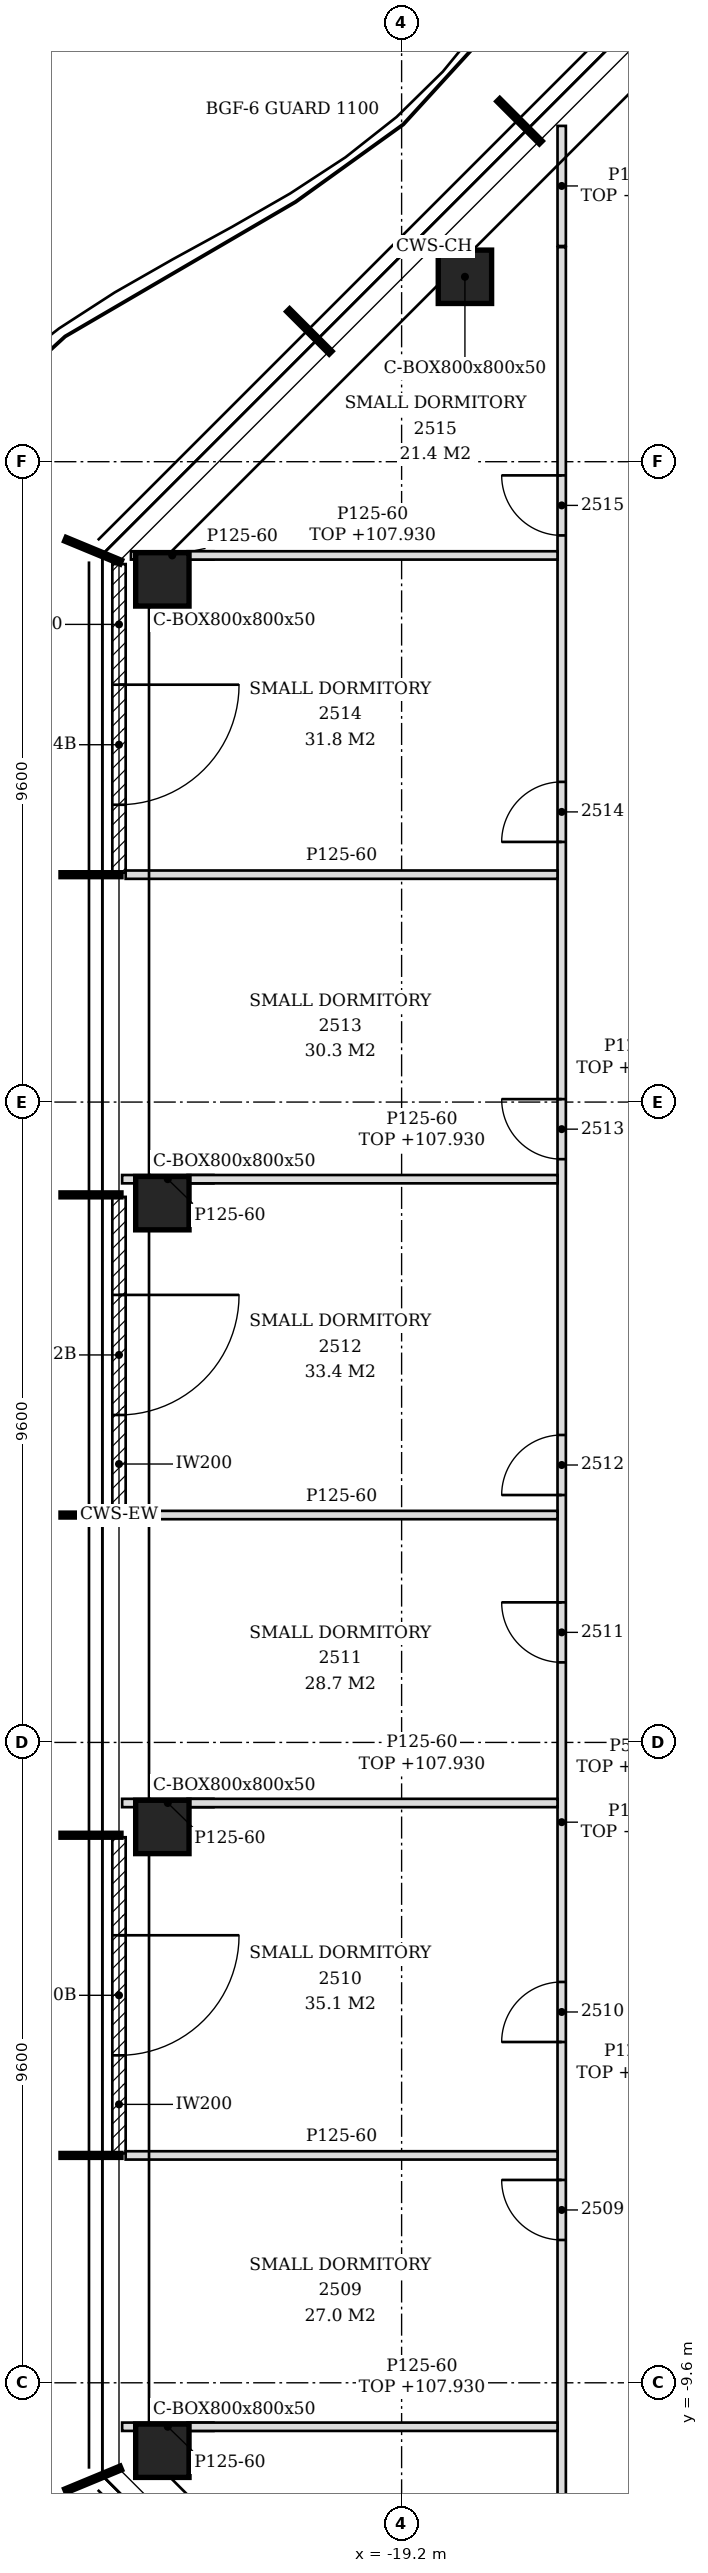
"""IFC4 building model, lengths in metres.
Left out: names, types, materials, properties, quantities, classifications, styles, units other than length and angle.
Written with IfcOpenShell. Run it as: python <this file> out.ifc"""

import sys

from ifc_helpers import new_model, si_unit, direction, frame, frame_2d, origin, origin_2d, place, context, subcontext, project, spatial, polyline, rectangle, hollow_rectangle, outline, extrude, clip, halfspace, element, fill, save


model = new_model("IFC4")
c1 = context("Model", 3, precision=1e-05, world=origin(), true_north=direction((0.0, 1.0)))
c2 = subcontext(c1, "Body", "Model", "MODEL_VIEW")
j1 = project(units=[si_unit("LENGTHUNIT", "METRE"), si_unit("PLANEANGLEUNIT", "RADIAN")], contexts=[c1])
p1 = place(None, origin())
s1 = spatial("IfcSite", under=j1, at=p1, CompositionType="ELEMENT")
p2 = place(p1, origin())
s2 = spatial("IfcBuilding", under=s1, at=p2, CompositionType="ELEMENT")
p3 = place(p2, frame((0.0, 0.0, 105.0)))
s3 = spatial("IfcBuildingStorey", under=s2, at=p3, CompositionType="ELEMENT", Elevation=105.0)
for number, where, z_axis, x_axis in (
    (1, (-18.251, 21.972, -0.15), (0.282, 0.188, 0.941), (-0.555, 0.832, 0.0)),
    (2, (-22.787, 17.436, -0.15), (0.282, 0.188, 0.941), (-0.555, 0.832, 0.0)),
    (3, (-22.787, 8.084, -0.15), (0.282, 0.188, 0.941), (-0.555, 0.832, 0.0)),
    (4, (-22.787, -1.267, -0.15), (0.282, 0.188, 0.941), (-0.555, 0.832, 0.0)),
    (5, (-22.787, -10.619, -0.15), (0.282, 0.188, 0.941), (-0.555, 0.832, 0.0)),
):
    element("IfcColumn", number, at=place(p3, frame(where, z_axis=z_axis, x_axis=x_axis)), inside=s3, PredefinedType="COLUMN", context=c2, shape_type="Clipping", body=[
        clip(clip(extrude(hollow_rectangle(XDim=0.8, YDim=0.8, WallThickness=0.05, at=origin_2d()), origin(), (0.0, 0.0, 1.0), 3.826), halfspace(frame((0.0, 0.0, 0.024), z_axis=(0.0, 0.0, 1.0), x_axis=(1.0, 0.0, 0.0)), True)), halfspace(frame((0.0, 0.0, 3.802), z_axis=(0.0, 0.0, 1.0), x_axis=(1.0, 0.0, 0.0)), False)),
    ])
p4 = place(p3, frame((-23.437, 17.665, 0.0), z_axis=(0.0, 0.0, 1.0), x_axis=(0.0, -1.0, 0.0)))
e6 = element("IfcWall", 6, at=p4, inside=s3, PredefinedType="NOTDEFINED", context=c2, shape_type="SweptSolid", body=[
    extrude(rectangle(XDim=4.626, YDim=0.2, at=frame_2d((2.313, 0.0))), origin(), (0.0, 0.0, 1.0), 3.45),
])
p5 = place(p4, frame((1.808, 0.0, 0.0)))
e7 = element("IfcOpeningElement", 7, at=p5, cuts=e6, PredefinedType="OPENING", context=c2, shape_type="SweptSolid", body=[
    extrude(rectangle(XDim=1.8, YDim=2.4, at=frame_2d((0.9, 1.2))), frame((0.0, 0.11, 0.0), z_axis=(0.0, -1.0, 0.0), x_axis=(1.0, 0.0, 0.0)), (0.0, 0.0, 1.0), 0.22),
])
p6 = place(p3, frame((-23.437, 8.179, 0.0), z_axis=(0.0, 0.0, 1.0), x_axis=(0.0, -1.0, 0.0)))
e8 = element("IfcWall", 8, at=p6, inside=s3, PredefinedType="NOTDEFINED", context=c2, shape_type="SweptSolid", body=[
    extrude(rectangle(XDim=4.74, YDim=0.2, at=frame_2d((2.37, 0.0))), origin(), (0.0, 0.0, 1.0), 3.45),
])
p7 = place(p6, frame((1.47, 0.0, 0.0)))
e9 = element("IfcOpeningElement", 9, at=p7, cuts=e8, PredefinedType="OPENING", context=c2, shape_type="SweptSolid", body=[
    extrude(rectangle(XDim=1.8, YDim=2.4, at=frame_2d((0.9, 1.2))), frame((0.0, 0.11, 0.0), z_axis=(0.0, -1.0, 0.0), x_axis=(1.0, 0.0, 0.0)), (0.0, 0.0, 1.0), 0.22),
])
p8 = place(p3, frame((-23.437, -1.421, 0.0), z_axis=(0.0, 0.0, 1.0), x_axis=(0.0, -1.0, 0.0)))
e10 = element("IfcWall", 10, at=p8, inside=s3, PredefinedType="NOTDEFINED", context=c2, shape_type="SweptSolid", body=[
    extrude(rectangle(XDim=4.74, YDim=0.2, at=frame_2d((2.37, 0.0))), origin(), (0.0, 0.0, 1.0), 3.45),
])
p9 = place(p8, frame((1.47, 0.0, 0.0)))
e11 = element("IfcOpeningElement", 11, at=p9, cuts=e10, PredefinedType="OPENING", context=c2, shape_type="SweptSolid", body=[
    extrude(rectangle(XDim=1.8, YDim=2.4, at=frame_2d((0.9, 1.2))), frame((0.0, 0.11, 0.0), z_axis=(0.0, -1.0, 0.0), x_axis=(1.0, 0.0, 0.0)), (0.0, 0.0, 1.0), 0.22),
])
p10 = place(p3, frame((-16.8, -14.137, 0.0), z_axis=(0.0, 0.0, 1.0), x_axis=(0.0, 1.0, 0.0)))
e12 = element("IfcWall", 12, at=p10, inside=s3, PredefinedType="PARTITIONING", context=c2, shape_type="SweptSolid", body=[
    extrude(outline(polyline([(0.0, 0.0), (36.554, 0.0), (36.554, 0.863), (36.554, 1.725), (36.554, 2.587), (36.554, 2.98), (0.0, 2.98), (0.0, 2.587), (0.0, 1.725), (0.0, 0.863), (0.0, 0.0)])), frame((0.0, 0.062, 0.0), z_axis=(0.0, -1.0, 0.0), x_axis=(1.0, 0.0, 0.0)), (0.0, 0.0, 1.0), 0.125),
])
p11 = place(p10, frame((1.038, 0.0, 0.0)))
e13 = element("IfcOpeningElement", 13, at=p11, cuts=e12, PredefinedType="OPENING", context=c2, shape_type="SweptSolid", body=[
    extrude(rectangle(XDim=0.9, YDim=2.1, at=frame_2d((0.45, 1.05))), frame((0.0, 0.073, 0.0), z_axis=(0.0, -1.0, 0.0), x_axis=(1.0, 0.0, 0.0)), (0.0, 0.0, 1.0), 0.145),
])
p12 = place(p10, frame((6.678, 0.0, 0.0)))
e14 = element("IfcOpeningElement", 14, at=p12, cuts=e12, PredefinedType="OPENING", context=c2, shape_type="SweptSolid", body=[
    extrude(rectangle(XDim=0.9, YDim=2.1, at=frame_2d((0.45, 1.05))), frame((0.0, 0.073, 0.0), z_axis=(0.0, -1.0, 0.0), x_axis=(1.0, 0.0, 0.0)), (0.0, 0.0, 1.0), 0.145),
])
p13 = place(p10, frame((9.646, 0.0, 0.0)))
e15 = element("IfcOpeningElement", 15, at=p13, cuts=e12, PredefinedType="OPENING", context=c2, shape_type="SweptSolid", body=[
    extrude(rectangle(XDim=0.9, YDim=2.1, at=frame_2d((0.45, 1.05))), frame((0.0, 0.073, 0.0), z_axis=(0.0, -1.0, 0.0), x_axis=(1.0, 0.0, 0.0)), (0.0, 0.0, 1.0), 0.145),
])
p14 = place(p10, frame((15.337, 0.0, 0.0)))
e16 = element("IfcOpeningElement", 16, at=p14, cuts=e12, PredefinedType="OPENING", context=c2, shape_type="SweptSolid", body=[
    extrude(rectangle(XDim=0.9, YDim=2.1, at=frame_2d((0.45, 1.05))), frame((0.0, 0.073, 0.0), z_axis=(0.0, -1.0, 0.0), x_axis=(1.0, 0.0, 0.0)), (0.0, 0.0, 1.0), 0.145),
])
p15 = place(p10, frame((17.846, 0.0, 0.0)))
e17 = element("IfcOpeningElement", 17, at=p15, cuts=e12, PredefinedType="OPENING", context=c2, shape_type="SweptSolid", body=[
    extrude(rectangle(XDim=0.9, YDim=2.1, at=frame_2d((0.45, 1.05))), frame((0.0, 0.073, 0.0), z_axis=(0.0, -1.0, 0.0), x_axis=(1.0, 0.0, 0.0)), (0.0, 0.0, 1.0), 0.145),
])
p16 = place(p10, frame((22.882, 0.0, 0.0)))
e18 = element("IfcOpeningElement", 18, at=p16, cuts=e12, PredefinedType="OPENING", context=c2, shape_type="SweptSolid", body=[
    extrude(rectangle(XDim=0.9, YDim=2.1, at=frame_2d((0.45, 1.05))), frame((0.0, 0.073, 0.0), z_axis=(0.0, -1.0, 0.0), x_axis=(1.0, 0.0, 0.0)), (0.0, 0.0, 1.0), 0.145),
])
p17 = place(p10, frame((27.637, 0.0, 0.0)))
e19 = element("IfcOpeningElement", 19, at=p17, cuts=e12, PredefinedType="OPENING", context=c2, shape_type="SweptSolid", body=[
    extrude(rectangle(XDim=0.9, YDim=2.1, at=frame_2d((0.45, 1.05))), frame((0.0, 0.073, 0.0), z_axis=(0.0, -1.0, 0.0), x_axis=(1.0, 0.0, 0.0)), (0.0, 0.0, 1.0), 0.145),
])
p18 = place(p10, frame((32.232, 0.0, 0.0)))
e20 = element("IfcOpeningElement", 20, at=p18, cuts=e12, PredefinedType="OPENING", context=c2, shape_type="SweptSolid", body=[
    extrude(rectangle(XDim=0.9, YDim=2.1, at=frame_2d((0.45, 1.05))), frame((0.0, 0.073, 0.0), z_axis=(0.0, -1.0, 0.0), x_axis=(1.0, 0.0, 0.0)), (0.0, 0.0, 1.0), 0.145),
])
p19 = place(p3, frame((-23.39, -10.259, 0.0), z_axis=(0.0, 0.0, 1.0), x_axis=(1.0, 0.0, 0.0)))
e21 = element("IfcWall", 21, at=p19, inside=s3, PredefinedType="PARTITIONING", context=c2, shape_type="SweptSolid", body=[
    extrude(outline(polyline([(0.0, 0.0), (0.327, 0.0), (0.331, 0.863), (0.622, 1.725), (0.995, 2.587), (1.369, 3.45), (0.0, 3.45), (0.0, 2.587), (0.0, 1.725), (0.0, 0.863), (0.0, 0.0)])), frame((0.0, 0.062, 0.0), z_axis=(0.0, -1.0, 0.0), x_axis=(1.0, 0.0, 0.0)), (0.0, 0.0, 1.0), 0.125),
])
p20 = place(p3, frame((-22.409, -10.259, 0.0), z_axis=(0.0, 0.0, 1.0), x_axis=(1.0, 0.0, 0.0)))
e22 = element("IfcWall", 22, at=p20, inside=s3, PredefinedType="PARTITIONING", context=c2, shape_type="SweptSolid", body=[
    extrude(outline(polyline([(0.0, 0.0), (5.547, 0.0), (5.547, 0.863), (5.547, 1.725), (5.547, 2.587), (5.547, 2.93), (0.977, 2.93), (0.977, 2.587), (0.747, 1.725), (0.373, 0.863), (0.0, 0.0)])), frame((0.0, 0.062, 0.0), z_axis=(0.0, -1.0, 0.0), x_axis=(1.0, 0.0, 0.0)), (0.0, 0.0, 1.0), 0.125),
])
p21 = place(p3, frame((-23.337, -6.191, 0.0), z_axis=(0.0, 0.0, 1.0), x_axis=(1.0, 0.0, 0.0)))
e23 = element("IfcWall", 23, at=p21, inside=s3, PredefinedType="PARTITIONING", context=c2, shape_type="SweptSolid", body=[
    extrude(outline(polyline([(0.0, 0.0), (6.475, 0.0), (6.475, 3.45), (1.779, 3.45), (1.777, 2.93), (1.479, 2.93), (1.477, 3.45), (0.0, 3.45), (0.0, 0.0)])), frame((0.0, 0.062, 0.0), z_axis=(0.0, -1.0, 0.0), x_axis=(1.0, 0.0, 0.0)), (0.0, 0.0, 1.0), 0.125),
])
p22 = place(p3, frame((-23.39, -0.908, 0.0), z_axis=(0.0, 0.0, 1.0), x_axis=(1.0, 0.0, 0.0)))
e24 = element("IfcWall", 24, at=p22, inside=s3, PredefinedType="PARTITIONING", context=c2, shape_type="SweptSolid", body=[
    extrude(outline(polyline([(0.0, 0.0), (0.327, 0.0), (0.331, 0.863), (0.622, 1.725), (0.996, 2.587), (1.369, 3.45), (0.0, 3.45), (0.0, 2.587), (0.0, 1.725), (0.0, 0.863), (0.0, 0.0)])), frame((0.0, 0.062, 0.0), z_axis=(0.0, -1.0, 0.0), x_axis=(1.0, 0.0, 0.0)), (0.0, 0.0, 1.0), 0.125),
])
p23 = place(p3, frame((-22.409, -0.908, 0.0), z_axis=(0.0, 0.0, 1.0), x_axis=(1.0, 0.0, 0.0)))
e25 = element("IfcWall", 25, at=p23, inside=s3, PredefinedType="PARTITIONING", context=c2, shape_type="SweptSolid", body=[
    extrude(outline(polyline([(0.0, 0.0), (5.546, 0.0), (5.546, 0.863), (5.546, 1.725), (5.546, 2.587), (5.546, 2.93), (0.975, 2.93), (0.975, 2.587), (0.747, 1.725), (0.373, 0.863), (0.0, 0.0)])), frame((0.0, 0.062, 0.0), z_axis=(0.0, -1.0, 0.0), x_axis=(1.0, 0.0, 0.0)), (0.0, 0.0, 1.0), 0.125),
])
p24 = place(p3, frame((-23.337, 3.409, 0.0), z_axis=(0.0, 0.0, 1.0), x_axis=(1.0, 0.0, 0.0)))
e26 = element("IfcWall", 26, at=p24, inside=s3, PredefinedType="PARTITIONING", context=c2, shape_type="SweptSolid", body=[
    extrude(outline(polyline([(0.0, 0.0), (6.475, 0.0), (6.475, 3.45), (1.779, 3.45), (1.777, 2.93), (1.479, 2.93), (1.477, 3.45), (0.0, 3.45), (0.0, 0.0)])), frame((0.0, 0.062, 0.0), z_axis=(0.0, -1.0, 0.0), x_axis=(1.0, 0.0, 0.0)), (0.0, 0.0, 1.0), 0.125),
])
p25 = place(p3, frame((-23.39, 8.444, 0.0), z_axis=(0.0, 0.0, 1.0), x_axis=(1.0, 0.0, 0.0)))
e27 = element("IfcWall", 27, at=p25, inside=s3, PredefinedType="PARTITIONING", context=c2, shape_type="SweptSolid", body=[
    extrude(outline(polyline([(0.0, 0.0), (0.327, 0.0), (0.331, 0.863), (0.622, 1.725), (0.995, 2.587), (1.369, 3.45), (0.0, 3.45), (0.0, 2.587), (0.0, 1.725), (0.0, 0.863), (0.0, 0.0)])), frame((0.0, 0.062, 0.0), z_axis=(0.0, -1.0, 0.0), x_axis=(1.0, 0.0, 0.0)), (0.0, 0.0, 1.0), 0.125),
])
p26 = place(p3, frame((-22.409, 8.444, 0.0), z_axis=(0.0, 0.0, 1.0), x_axis=(1.0, 0.0, 0.0)))
e28 = element("IfcWall", 28, at=p26, inside=s3, PredefinedType="PARTITIONING", context=c2, shape_type="SweptSolid", body=[
    extrude(outline(polyline([(0.0, 0.0), (5.547, 0.0), (5.547, 0.863), (5.547, 1.725), (5.547, 2.587), (5.547, 2.93), (0.977, 2.93), (0.977, 2.587), (0.747, 1.725), (0.373, 0.863), (0.0, 0.0)])), frame((0.0, 0.062, 0.0), z_axis=(0.0, -1.0, 0.0), x_axis=(1.0, 0.0, 0.0)), (0.0, 0.0, 1.0), 0.125),
])
p27 = place(p3, frame((-23.337, 13.009, 0.0), z_axis=(0.0, 0.0, 1.0), x_axis=(1.0, 0.0, 0.0)))
e29 = element("IfcWall", 29, at=p27, inside=s3, PredefinedType="PARTITIONING", context=c2, shape_type="SweptSolid", body=[
    extrude(outline(polyline([(0.0, 0.0), (6.475, 0.0), (6.475, 3.45), (1.779, 3.45), (1.777, 2.93), (1.479, 2.93), (1.477, 3.45), (0.0, 3.45), (0.0, 0.0)])), frame((0.0, 0.062, 0.0), z_axis=(0.0, -1.0, 0.0), x_axis=(1.0, 0.0, 0.0)), (0.0, 0.0, 1.0), 0.125),
])
p28 = place(p3, frame((-23.258, 17.795, 0.0), z_axis=(0.0, 0.0, 1.0), x_axis=(1.0, 0.0, 0.0)))
e30 = element("IfcWall", 30, at=p28, inside=s3, PredefinedType="PARTITIONING", context=c2, shape_type="SweptSolid", body=[
    extrude(outline(polyline([(0.0, 0.0), (0.195, 0.0), (0.198, 0.863), (0.49, 1.725), (0.863, 2.587), (1.237, 3.45), (0.0, 3.45), (0.0, 2.587), (0.0, 1.725), (0.0, 0.863), (0.0, 0.0)])), frame((0.0, 0.062, 0.0), z_axis=(0.0, -1.0, 0.0), x_axis=(1.0, 0.0, 0.0)), (0.0, 0.0, 1.0), 0.125),
])
p29 = place(p3, frame((-22.409, 17.795, 0.0), z_axis=(0.0, 0.0, 1.0), x_axis=(1.0, 0.0, 0.0)))
e31 = element("IfcWall", 31, at=p29, inside=s3, PredefinedType="PARTITIONING", context=c2, shape_type="SweptSolid", body=[
    extrude(outline(polyline([(0.0, 0.0), (5.546, 0.0), (5.546, 0.863), (5.546, 1.725), (5.546, 2.587), (5.546, 2.93), (0.976, 2.93), (0.976, 2.587), (0.747, 1.725), (0.373, 0.863), (0.0, 0.0)])), frame((0.0, 0.062, 0.0), z_axis=(0.0, -1.0, 0.0), x_axis=(1.0, 0.0, 0.0)), (0.0, 0.0, 1.0), 0.125),
])
p30 = place(p3, frame((-16.8, 22.434, 0.0), z_axis=(0.0, 0.0, 1.0), x_axis=(0.0, 1.0, 0.0)))
e32 = element("IfcWall", 32, at=p30, inside=s3, PredefinedType="PARTITIONING", context=c2, shape_type="SweptSolid", body=[
    extrude(outline(polyline([(0.0, 0.0), (1.801, 0.0), (1.801, 0.863), (1.801, 1.725), (1.801, 2.587), (1.801, 2.63), (0.028, 2.63), (0.0, 2.587), (0.0, 1.725), (0.0, 0.863), (0.0, 0.0)])), frame((0.0, 0.062, 0.0), z_axis=(0.0, -1.0, 0.0), x_axis=(1.0, 0.0, 0.0)), (0.0, 0.0, 1.0), 0.125),
])
p31 = place(p5, origin())
e33 = element("IfcDoor", 33, at=p31, inside=s3, OperationType="SINGLE_SWING_LEFT", PredefinedType="DOOR", context=c2, shape_type="SweptSolid", body=[
    extrude(rectangle(XDim=1.8, YDim=2.4, at=frame_2d((0.9, 1.2))), frame((0.0, 0.025, 0.0), z_axis=(0.0, -1.0, 0.0), x_axis=(1.0, 0.0, 0.0)), (0.0, 0.0, 1.0), 0.05),
])
fill(e7, e33)
p32 = place(p7, origin())
e34 = element("IfcDoor", 34, at=p32, inside=s3, OperationType="SINGLE_SWING_LEFT", PredefinedType="DOOR", context=c2, shape_type="SweptSolid", body=[
    extrude(rectangle(XDim=1.8, YDim=2.4, at=frame_2d((0.9, 1.2))), frame((0.0, 0.025, 0.0), z_axis=(0.0, -1.0, 0.0), x_axis=(1.0, 0.0, 0.0)), (0.0, 0.0, 1.0), 0.05),
])
fill(e9, e34)
p33 = place(p9, origin())
e35 = element("IfcDoor", 35, at=p33, inside=s3, OperationType="SINGLE_SWING_LEFT", PredefinedType="DOOR", context=c2, shape_type="SweptSolid", body=[
    extrude(rectangle(XDim=1.8, YDim=2.4, at=frame_2d((0.9, 1.2))), frame((0.0, 0.025, 0.0), z_axis=(0.0, -1.0, 0.0), x_axis=(1.0, 0.0, 0.0)), (0.0, 0.0, 1.0), 0.05),
])
fill(e11, e35)
p34 = place(p12, origin())
e36 = element("IfcDoor", 36, at=p34, inside=s3, OperationType="SINGLE_SWING_RIGHT", PredefinedType="DOOR", context=c2, shape_type="SweptSolid", body=[
    extrude(rectangle(XDim=0.9, YDim=2.1, at=frame_2d((0.45, 1.05))), frame((0.0, 0.025, 0.0), z_axis=(0.0, -1.0, 0.0), x_axis=(1.0, 0.0, 0.0)), (0.0, 0.0, 1.0), 0.05),
])
fill(e14, e36)
p35 = place(p13, origin())
e37 = element("IfcDoor", 37, at=p35, inside=s3, OperationType="SINGLE_SWING_LEFT", PredefinedType="DOOR", context=c2, shape_type="SweptSolid", body=[
    extrude(rectangle(XDim=0.9, YDim=2.1, at=frame_2d((0.45, 1.05))), frame((0.0, 0.025, 0.0), z_axis=(0.0, -1.0, 0.0), x_axis=(1.0, 0.0, 0.0)), (0.0, 0.0, 1.0), 0.05),
])
fill(e15, e37)
p36 = place(p14, origin())
e38 = element("IfcDoor", 38, at=p36, inside=s3, OperationType="SINGLE_SWING_RIGHT", PredefinedType="DOOR", context=c2, shape_type="SweptSolid", body=[
    extrude(rectangle(XDim=0.9, YDim=2.1, at=frame_2d((0.45, 1.05))), frame((0.0, 0.025, 0.0), z_axis=(0.0, -1.0, 0.0), x_axis=(1.0, 0.0, 0.0)), (0.0, 0.0, 1.0), 0.05),
])
fill(e16, e38)
p37 = place(p15, origin())
e39 = element("IfcDoor", 39, at=p37, inside=s3, OperationType="SINGLE_SWING_LEFT", PredefinedType="DOOR", context=c2, shape_type="SweptSolid", body=[
    extrude(rectangle(XDim=0.9, YDim=2.1, at=frame_2d((0.45, 1.05))), frame((0.0, 0.025, 0.0), z_axis=(0.0, -1.0, 0.0), x_axis=(1.0, 0.0, 0.0)), (0.0, 0.0, 1.0), 0.05),
])
fill(e17, e39)
p38 = place(p16, origin())
e40 = element("IfcDoor", 40, at=p38, inside=s3, OperationType="SINGLE_SWING_RIGHT", PredefinedType="DOOR", context=c2, shape_type="SweptSolid", body=[
    extrude(rectangle(XDim=0.9, YDim=2.1, at=frame_2d((0.45, 1.05))), frame((0.0, 0.025, 0.0), z_axis=(0.0, -1.0, 0.0), x_axis=(1.0, 0.0, 0.0)), (0.0, 0.0, 1.0), 0.05),
])
fill(e18, e40)
p39 = place(p17, origin())
e41 = element("IfcDoor", 41, at=p39, inside=s3, OperationType="SINGLE_SWING_LEFT", PredefinedType="DOOR", context=c2, shape_type="SweptSolid", body=[
    extrude(rectangle(XDim=0.9, YDim=2.1, at=frame_2d((0.45, 1.05))), frame((0.0, 0.025, 0.0), z_axis=(0.0, -1.0, 0.0), x_axis=(1.0, 0.0, 0.0)), (0.0, 0.0, 1.0), 0.05),
])
fill(e19, e41)
p40 = place(p18, origin())
e42 = element("IfcDoor", 42, at=p40, inside=s3, OperationType="SINGLE_SWING_RIGHT", PredefinedType="DOOR", context=c2, shape_type="SweptSolid", body=[
    extrude(rectangle(XDim=0.9, YDim=2.1, at=frame_2d((0.45, 1.05))), frame((0.0, 0.025, 0.0), z_axis=(0.0, -1.0, 0.0), x_axis=(1.0, 0.0, 0.0)), (0.0, 0.0, 1.0), 0.05),
])
fill(e20, e42)
save(model, sys.argv[1])
